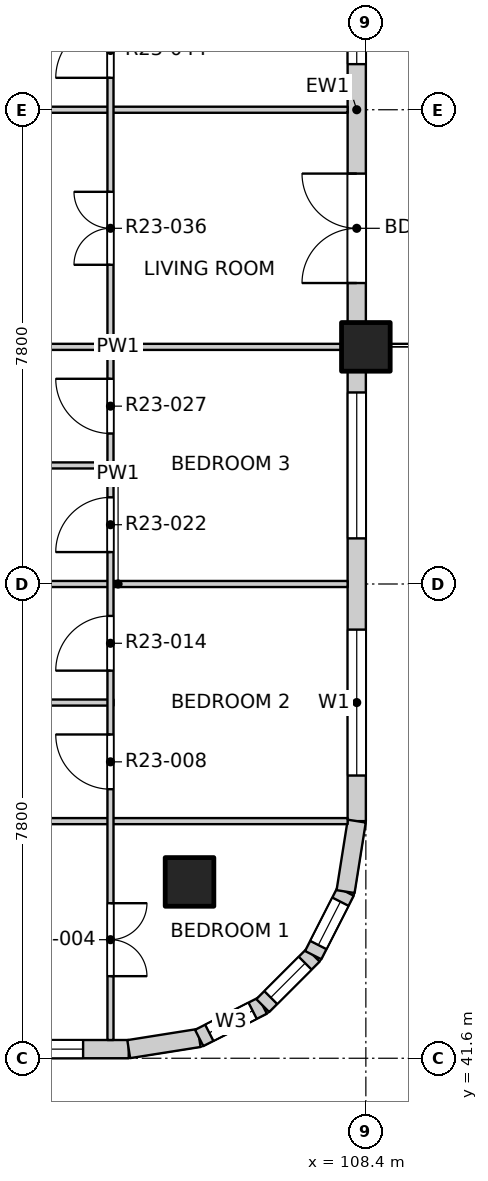
"""IFC4 building model, lengths in metres.
Left out: names, types, materials, properties, quantities, classifications, styles, units other than length and angle.
Written with IfcOpenShell. Run it as: python <this file> out.ifc"""

import sys

from ifc_helpers import new_model, si_unit, direction, frame, frame_2d, origin, origin_2d, place, context, subcontext, project, spatial, rectangle, extrude, element, fill, save


model = new_model("IFC4")
c1 = context("Model", 3, precision=1e-05, world=origin(), true_north=direction((0.0, 1.0)))
c2 = subcontext(c1, "Body", "Model", "MODEL_VIEW")
j1 = project(units=[si_unit("LENGTHUNIT", "METRE"), si_unit("PLANEANGLEUNIT", "RADIAN")], contexts=[c1])
p1 = place(None, origin())
s1 = spatial("IfcSite", under=j1, at=p1, CompositionType="ELEMENT")
p2 = place(p1, origin())
s2 = spatial("IfcBuilding", under=s1, at=p2, CompositionType="ELEMENT")
p3 = place(p2, frame((0.0, 0.0, 234.7)))
s3 = spatial("IfcBuildingStorey", under=s2, at=p3, CompositionType="ELEMENT", Elevation=234.7)
for number, where, z_axis, x_axis in (
    (1, (105.5, 44.5, -0.25), (0.0, 0.0, 1.0), (1.0, 0.0, 0.0)),
    (2, (108.4, 53.3, -0.25), (0.0, 0.0, 1.0), (1.0, 0.0, 0.0)),
):
    element("IfcColumn", number, at=place(p3, frame(where, z_axis=z_axis, x_axis=x_axis)), inside=s3, PredefinedType="COLUMN", context=c2, shape_type="SweptSolid", body=[
        extrude(rectangle(XDim=0.8, YDim=0.8, at=origin_2d()), origin(), (0.0, 0.0, 1.0), 3.4),
    ])
p4 = place(p3, frame((97.1, 41.75, 0.0), z_axis=(0.0, 0.0, 1.0), x_axis=(1.0, 0.0, 0.0)))
e3 = element("IfcWall", 3, at=p4, inside=s3, PredefinedType="SOLIDWALL", context=c2, shape_type="SweptSolid", body=[
    extrude(rectangle(XDim=7.4, YDim=0.3, at=frame_2d((3.7, 0.0))), origin(), (0.0, 0.0, 1.0), 2.7),
])
p5 = place(p4, frame((0.35, 0.0, 0.9)))
e4 = element("IfcOpeningElement", 4, at=p5, cuts=e3, PredefinedType="OPENING", context=c2, shape_type="SweptSolid", body=[
    extrude(rectangle(XDim=2.4, YDim=1.8, at=frame_2d((1.2, 0.9))), frame((0.0, 0.16, 0.0), z_axis=(0.0, -1.0, 0.0), x_axis=(1.0, 0.0, 0.0)), (0.0, 0.0, 1.0), 0.32),
])
p6 = place(p4, frame((4.25, 0.0, 0.9)))
e5 = element("IfcOpeningElement", 5, at=p6, cuts=e3, PredefinedType="OPENING", context=c2, shape_type="SweptSolid", body=[
    extrude(rectangle(XDim=2.4, YDim=1.8, at=frame_2d((1.2, 0.9))), frame((0.0, 0.16, 0.0), z_axis=(0.0, -1.0, 0.0), x_axis=(1.0, 0.0, 0.0)), (0.0, 0.0, 1.0), 0.32),
])
p7 = place(p3, frame((108.25, 45.5, 0.0), z_axis=(0.0, 0.0, 1.0), x_axis=(0.0, 1.0, 0.0)))
e6 = element("IfcWall", 6, at=p7, inside=s3, PredefinedType="SOLIDWALL", context=c2, shape_type="SweptSolid", body=[
    extrude(rectangle(XDim=7.4, YDim=0.3, at=frame_2d((3.7, 0.0))), origin(), (0.0, 0.0, 1.0), 2.7),
])
p8 = place(p7, frame((0.75, 0.0, 0.9)))
e7 = element("IfcOpeningElement", 7, at=p8, cuts=e6, PredefinedType="OPENING", context=c2, shape_type="SweptSolid", body=[
    extrude(rectangle(XDim=2.4, YDim=1.8, at=frame_2d((1.2, 0.9))), frame((0.0, 0.16, 0.0), z_axis=(0.0, -1.0, 0.0), x_axis=(1.0, 0.0, 0.0)), (0.0, 0.0, 1.0), 0.32),
])
p9 = place(p7, frame((4.65, 0.0, 0.9)))
e8 = element("IfcOpeningElement", 8, at=p9, cuts=e6, PredefinedType="OPENING", context=c2, shape_type="SweptSolid", body=[
    extrude(rectangle(XDim=2.4, YDim=1.8, at=frame_2d((1.2, 0.9))), frame((0.0, 0.16, 0.0), z_axis=(0.0, -1.0, 0.0), x_axis=(1.0, 0.0, 0.0)), (0.0, 0.0, 1.0), 0.32),
])
p10 = place(p3, frame((108.25, 53.7, 0.0), z_axis=(0.0, 0.0, 1.0), x_axis=(0.0, 1.0, 0.0)))
e9 = element("IfcWall", 9, at=p10, inside=s3, PredefinedType="SOLIDWALL", context=c2, shape_type="SweptSolid", body=[
    extrude(rectangle(XDim=7.0, YDim=0.3, at=frame_2d((3.5, 0.0))), origin(), (0.0, 0.0, 1.0), 2.7),
])
p11 = place(p10, frame((0.65, 0.0, 0.0)))
e10 = element("IfcOpeningElement", 10, at=p11, cuts=e9, PredefinedType="OPENING", context=c2, shape_type="SweptSolid", body=[
    extrude(rectangle(XDim=1.8, YDim=2.4, at=frame_2d((0.9, 1.2))), frame((0.0, 0.16, 0.0), z_axis=(0.0, -1.0, 0.0), x_axis=(1.0, 0.0, 0.0)), (0.0, 0.0, 1.0), 0.32),
])
p12 = place(p10, frame((4.25, 0.0, 0.9)))
e11 = element("IfcOpeningElement", 11, at=p12, cuts=e9, PredefinedType="OPENING", context=c2, shape_type="SweptSolid", body=[
    extrude(rectangle(XDim=2.4, YDim=1.8, at=frame_2d((1.2, 0.9))), frame((0.0, 0.16, 0.0), z_axis=(0.0, -1.0, 0.0), x_axis=(1.0, 0.0, 0.0)), (0.0, 0.0, 1.0), 0.32),
])
p13 = place(p3, frame((104.5, 41.75, 0.0), z_axis=(0.0, 0.0, 1.0), x_axis=(0.987678452879, 0.156496880861, 0.0)))
e12 = element("IfcWall", 12, at=p13, inside=s3, PredefinedType="SOLIDWALL", context=c2, shape_type="SweptSolid", body=[
    extrude(rectangle(XDim=1.173, YDim=0.3, at=frame_2d((0.586, 0.0))), origin(), (0.0, 0.0, 1.0), 2.7),
])
p14 = place(p3, frame((105.659, 41.934, 0.0), z_axis=(0.0, 0.0, 1.0), x_axis=(0.890988677504, 0.454025524128, 0.0)))
e13 = element("IfcWall", 13, at=p14, inside=s3, PredefinedType="SOLIDWALL", context=c2, shape_type="SweptSolid", body=[
    extrude(rectangle(XDim=1.173, YDim=0.3, at=frame_2d((0.587, 0.0))), origin(), (0.0, 0.0, 1.0), 2.7),
])
p15 = place(p14, frame((0.187, 0.0, 0.9)))
e14 = element("IfcOpeningElement", 14, at=p15, cuts=e13, PredefinedType="OPENING", context=c2, shape_type="SweptSolid", body=[
    extrude(rectangle(XDim=0.8, YDim=1.2, at=frame_2d((0.4, 0.6))), frame((0.0, 0.16, 0.0), z_axis=(0.0, -1.0, 0.0), x_axis=(1.0, 0.0, 0.0)), (0.0, 0.0, 1.0), 0.32),
])
p16 = place(p3, frame((106.704, 42.466, 0.0), z_axis=(0.0, 0.0, 1.0), x_axis=(0.707106781187, 0.707106781187, 0.0)))
e15 = element("IfcWall", 15, at=p16, inside=s3, PredefinedType="SOLIDWALL", context=c2, shape_type="SweptSolid", body=[
    extrude(rectangle(XDim=1.173, YDim=0.3, at=frame_2d((0.586, 0.0))), origin(), (0.0, 0.0, 1.0), 2.7),
])
p17 = place(p16, frame((0.187, 0.0, 0.9)))
e16 = element("IfcOpeningElement", 16, at=p17, cuts=e15, PredefinedType="OPENING", context=c2, shape_type="SweptSolid", body=[
    extrude(rectangle(XDim=0.8, YDim=1.2, at=frame_2d((0.4, 0.6))), frame((0.0, 0.16, 0.0), z_axis=(0.0, -1.0, 0.0), x_axis=(1.0, 0.0, 0.0)), (0.0, 0.0, 1.0), 0.32),
])
p18 = place(p3, frame((107.534, 43.296, 0.0), z_axis=(0.0, 0.0, 1.0), x_axis=(0.454025524128, 0.890988677504, 0.0)))
e17 = element("IfcWall", 17, at=p18, inside=s3, PredefinedType="SOLIDWALL", context=c2, shape_type="SweptSolid", body=[
    extrude(rectangle(XDim=1.173, YDim=0.3, at=frame_2d((0.587, 0.0))), origin(), (0.0, 0.0, 1.0), 2.7),
])
p19 = place(p18, frame((0.187, 0.0, 0.9)))
e18 = element("IfcOpeningElement", 18, at=p19, cuts=e17, PredefinedType="OPENING", context=c2, shape_type="SweptSolid", body=[
    extrude(rectangle(XDim=0.8, YDim=1.2, at=frame_2d((0.4, 0.6))), frame((0.0, 0.16, 0.0), z_axis=(0.0, -1.0, 0.0), x_axis=(1.0, 0.0, 0.0)), (0.0, 0.0, 1.0), 0.32),
])
p20 = place(p3, frame((108.066, 44.341, 0.0), z_axis=(0.0, 0.0, 1.0), x_axis=(0.156496880861, 0.987678452879, 0.0)))
e19 = element("IfcWall", 19, at=p20, inside=s3, PredefinedType="SOLIDWALL", context=c2, shape_type="SweptSolid", body=[
    extrude(rectangle(XDim=1.173, YDim=0.3, at=frame_2d((0.586, 0.0))), origin(), (0.0, 0.0, 1.0), 2.7),
])
p21 = place(p3, frame((96.625, 45.5, 0.0), z_axis=(0.0, 0.0, 1.0), x_axis=(1.0, 0.0, 0.0)))
e20 = element("IfcWall", 20, at=p21, inside=s3, PredefinedType="PARTITIONING", context=c2, shape_type="SweptSolid", body=[
    extrude(rectangle(XDim=11.475, YDim=0.1, at=frame_2d((5.738, 0.0))), origin(), (0.0, 0.0, 1.0), 3.15),
])
p22 = place(p21, frame((2.61, 0.0, 0.0)))
e21 = element("IfcOpeningElement", 21, at=p22, cuts=e20, PredefinedType="OPENING", context=c2, shape_type="SweptSolid", body=[
    extrude(rectangle(XDim=0.9, YDim=2.1, at=frame_2d((0.45, 1.05))), frame((0.0, 0.06, 0.0), z_axis=(0.0, -1.0, 0.0), x_axis=(1.0, 0.0, 0.0)), (0.0, 0.0, 1.0), 0.12),
])
p23 = place(p3, frame((100.55, 47.45, 0.0), z_axis=(0.0, 0.0, 1.0), x_axis=(1.0, 0.0, 0.0)))
e22 = element("IfcWall", 22, at=p23, inside=s3, PredefinedType="PARTITIONING", context=c2, shape_type="SweptSolid", body=[
    extrude(rectangle(XDim=3.7, YDim=0.1, at=frame_2d((1.85, 0.0))), origin(), (0.0, 0.0, 1.0), 3.15),
])
p24 = place(p3, frame((100.55, 49.4, 0.0), z_axis=(0.0, 0.0, 1.0), x_axis=(1.0, 0.0, 0.0)))
e23 = element("IfcWall", 23, at=p24, inside=s3, PredefinedType="PARTITIONING", context=c2, shape_type="SweptSolid", body=[
    extrude(rectangle(XDim=7.55, YDim=0.1, at=frame_2d((3.775, 0.0))), origin(), (0.0, 0.0, 1.0), 3.15),
])
p25 = place(p3, frame((100.55, 51.35, 0.0), z_axis=(0.0, 0.0, 1.0), x_axis=(1.0, 0.0, 0.0)))
e24 = element("IfcWall", 24, at=p25, inside=s3, PredefinedType="PARTITIONING", context=c2, shape_type="SweptSolid", body=[
    extrude(rectangle(XDim=3.7, YDim=0.1, at=frame_2d((1.85, 0.0))), origin(), (0.0, 0.0, 1.0), 3.15),
])
for number, where, z_axis, x_axis in (
    (25, (100.55, 53.3, 0.0), (0.0, 0.0, 1.0), (1.0, 0.0, 0.0)),
    (26, (100.55, 57.2, 0.0), (0.0, 0.0, 1.0), (1.0, 0.0, 0.0)),
):
    element("IfcWall", number, at=place(p3, frame(where, z_axis=z_axis, x_axis=x_axis)), inside=s3, PredefinedType="PARTITIONING", context=c2, shape_type="SweptSolid", body=[
        extrude(rectangle(XDim=7.55, YDim=0.1, at=frame_2d((3.775, 0.0))), origin(), (0.0, 0.0, 1.0), 3.15),
    ])
p26 = place(p3, frame((104.2, 41.9, 0.0), z_axis=(0.0, 0.0, 1.0), x_axis=(0.0, 1.0, 0.0)))
e27 = element("IfcWall", 27, at=p26, inside=s3, PredefinedType="PARTITIONING", context=c2, shape_type="SweptSolid", body=[
    extrude(rectangle(XDim=19.1, YDim=0.1, at=frame_2d((9.55, 0.0))), origin(), (0.0, 0.0, 1.0), 3.15),
])
p27 = place(p26, frame((1.05, 0.0, 0.0)))
e28 = element("IfcOpeningElement", 28, at=p27, cuts=e27, PredefinedType="OPENING", context=c2, shape_type="SweptSolid", body=[
    extrude(rectangle(XDim=1.2, YDim=2.1, at=frame_2d((0.6, 1.05))), frame((0.0, 0.06, 0.0), z_axis=(0.0, -1.0, 0.0), x_axis=(1.0, 0.0, 0.0)), (0.0, 0.0, 1.0), 0.12),
])
p28 = place(p26, frame((4.125, 0.0, 0.0)))
e29 = element("IfcOpeningElement", 29, at=p28, cuts=e27, PredefinedType="OPENING", context=c2, shape_type="SweptSolid", body=[
    extrude(rectangle(XDim=0.9, YDim=2.1, at=frame_2d((0.45, 1.05))), frame((0.0, 0.06, 0.0), z_axis=(0.0, -1.0, 0.0), x_axis=(1.0, 0.0, 0.0)), (0.0, 0.0, 1.0), 0.12),
])
p29 = place(p26, frame((6.075, 0.0, 0.0)))
e30 = element("IfcOpeningElement", 30, at=p29, cuts=e27, PredefinedType="OPENING", context=c2, shape_type="SweptSolid", body=[
    extrude(rectangle(XDim=0.9, YDim=2.1, at=frame_2d((0.45, 1.05))), frame((0.0, 0.06, 0.0), z_axis=(0.0, -1.0, 0.0), x_axis=(1.0, 0.0, 0.0)), (0.0, 0.0, 1.0), 0.12),
])
p30 = place(p26, frame((8.025, 0.0, 0.0)))
e31 = element("IfcOpeningElement", 31, at=p30, cuts=e27, PredefinedType="OPENING", context=c2, shape_type="SweptSolid", body=[
    extrude(rectangle(XDim=0.9, YDim=2.1, at=frame_2d((0.45, 1.05))), frame((0.0, 0.06, 0.0), z_axis=(0.0, -1.0, 0.0), x_axis=(1.0, 0.0, 0.0)), (0.0, 0.0, 1.0), 0.12),
])
p31 = place(p26, frame((9.975, 0.0, 0.0)))
e32 = element("IfcOpeningElement", 32, at=p31, cuts=e27, PredefinedType="OPENING", context=c2, shape_type="SweptSolid", body=[
    extrude(rectangle(XDim=0.9, YDim=2.1, at=frame_2d((0.45, 1.05))), frame((0.0, 0.06, 0.0), z_axis=(0.0, -1.0, 0.0), x_axis=(1.0, 0.0, 0.0)), (0.0, 0.0, 1.0), 0.12),
])
p32 = place(p26, frame((12.75, 0.0, 0.0)))
e33 = element("IfcOpeningElement", 33, at=p32, cuts=e27, PredefinedType="OPENING", context=c2, shape_type="SweptSolid", body=[
    extrude(rectangle(XDim=1.2, YDim=2.1, at=frame_2d((0.6, 1.05))), frame((0.0, 0.06, 0.0), z_axis=(0.0, -1.0, 0.0), x_axis=(1.0, 0.0, 0.0)), (0.0, 0.0, 1.0), 0.12),
])
p33 = place(p26, frame((15.825, 0.0, 0.0)))
e34 = element("IfcOpeningElement", 34, at=p33, cuts=e27, PredefinedType="OPENING", context=c2, shape_type="SweptSolid", body=[
    extrude(rectangle(XDim=0.9, YDim=2.1, at=frame_2d((0.45, 1.05))), frame((0.0, 0.06, 0.0), z_axis=(0.0, -1.0, 0.0), x_axis=(1.0, 0.0, 0.0)), (0.0, 0.0, 1.0), 0.12),
])
p34 = place(p26, frame((17.775, 0.0, 0.0)))
e35 = element("IfcOpeningElement", 35, at=p34, cuts=e27, PredefinedType="OPENING", context=c2, shape_type="SweptSolid", body=[
    extrude(rectangle(XDim=0.9, YDim=2.1, at=frame_2d((0.45, 1.05))), frame((0.0, 0.06, 0.0), z_axis=(0.0, -1.0, 0.0), x_axis=(1.0, 0.0, 0.0)), (0.0, 0.0, 1.0), 0.12),
])
p35 = place(p6, origin())
e36 = element("IfcWindow", 36, at=p35, inside=s3, PartitioningType="DOUBLE_PANEL_VERTICAL", PredefinedType="WINDOW", context=c2, shape_type="SweptSolid", body=[
    extrude(rectangle(XDim=2.4, YDim=1.8, at=frame_2d((1.2, 0.9))), frame((0.0, 0.03, 0.0), z_axis=(0.0, -1.0, 0.0), x_axis=(1.0, 0.0, 0.0)), (0.0, 0.0, 1.0), 0.06),
])
fill(e5, e36)
p36 = place(p8, origin())
e37 = element("IfcWindow", 37, at=p36, inside=s3, PartitioningType="DOUBLE_PANEL_VERTICAL", PredefinedType="WINDOW", context=c2, shape_type="SweptSolid", body=[
    extrude(rectangle(XDim=2.4, YDim=1.8, at=frame_2d((1.2, 0.9))), frame((0.0, 0.03, 0.0), z_axis=(0.0, -1.0, 0.0), x_axis=(1.0, 0.0, 0.0)), (0.0, 0.0, 1.0), 0.06),
])
fill(e7, e37)
p37 = place(p9, origin())
e38 = element("IfcWindow", 38, at=p37, inside=s3, PartitioningType="DOUBLE_PANEL_VERTICAL", PredefinedType="WINDOW", context=c2, shape_type="SweptSolid", body=[
    extrude(rectangle(XDim=2.4, YDim=1.8, at=frame_2d((1.2, 0.9))), frame((0.0, 0.03, 0.0), z_axis=(0.0, -1.0, 0.0), x_axis=(1.0, 0.0, 0.0)), (0.0, 0.0, 1.0), 0.06),
])
fill(e8, e38)
p38 = place(p11, origin())
e39 = element("IfcDoor", 39, at=p38, inside=s3, OperationType="DOUBLE_DOOR_SINGLE_SWING", PredefinedType="DOOR", context=c2, shape_type="SweptSolid", body=[
    extrude(rectangle(XDim=1.8, YDim=2.4, at=frame_2d((0.9, 1.2))), frame((0.0, 0.025, 0.0), z_axis=(0.0, -1.0, 0.0), x_axis=(1.0, 0.0, 0.0)), (0.0, 0.0, 1.0), 0.05),
])
fill(e10, e39)
p39 = place(p12, origin())
e40 = element("IfcWindow", 40, at=p39, inside=s3, PartitioningType="DOUBLE_PANEL_VERTICAL", PredefinedType="WINDOW", context=c2, shape_type="SweptSolid", body=[
    extrude(rectangle(XDim=2.4, YDim=1.8, at=frame_2d((1.2, 0.9))), frame((0.0, 0.03, 0.0), z_axis=(0.0, -1.0, 0.0), x_axis=(1.0, 0.0, 0.0)), (0.0, 0.0, 1.0), 0.06),
])
fill(e11, e40)
p40 = place(p15, origin())
e41 = element("IfcWindow", 41, at=p40, inside=s3, PartitioningType="SINGLE_PANEL", PredefinedType="WINDOW", context=c2, shape_type="SweptSolid", body=[
    extrude(rectangle(XDim=0.8, YDim=1.2, at=frame_2d((0.4, 0.6))), frame((0.0, 0.03, 0.0), z_axis=(0.0, -1.0, 0.0), x_axis=(1.0, 0.0, 0.0)), (0.0, 0.0, 1.0), 0.06),
])
fill(e14, e41)
p41 = place(p17, origin())
e42 = element("IfcWindow", 42, at=p41, inside=s3, PartitioningType="SINGLE_PANEL", PredefinedType="WINDOW", context=c2, shape_type="SweptSolid", body=[
    extrude(rectangle(XDim=0.8, YDim=1.2, at=frame_2d((0.4, 0.6))), frame((0.0, 0.03, 0.0), z_axis=(0.0, -1.0, 0.0), x_axis=(1.0, 0.0, 0.0)), (0.0, 0.0, 1.0), 0.06),
])
fill(e16, e42)
p42 = place(p19, origin())
e43 = element("IfcWindow", 43, at=p42, inside=s3, PartitioningType="SINGLE_PANEL", PredefinedType="WINDOW", context=c2, shape_type="SweptSolid", body=[
    extrude(rectangle(XDim=0.8, YDim=1.2, at=frame_2d((0.4, 0.6))), frame((0.0, 0.03, 0.0), z_axis=(0.0, -1.0, 0.0), x_axis=(1.0, 0.0, 0.0)), (0.0, 0.0, 1.0), 0.06),
])
fill(e18, e43)
p43 = place(p27, origin())
e44 = element("IfcDoor", 44, at=p43, inside=s3, OperationType="DOUBLE_DOOR_SINGLE_SWING", PredefinedType="DOOR", context=c2, shape_type="SweptSolid", body=[
    extrude(rectangle(XDim=1.2, YDim=2.1, at=frame_2d((0.6, 1.05))), frame((0.0, 0.025, 0.0), z_axis=(0.0, -1.0, 0.0), x_axis=(1.0, 0.0, 0.0)), (0.0, 0.0, 1.0), 0.05),
])
fill(e28, e44)
p44 = place(p28, origin())
e45 = element("IfcDoor", 45, at=p44, inside=s3, OperationType="SINGLE_SWING_RIGHT", PredefinedType="DOOR", context=c2, shape_type="SweptSolid", body=[
    extrude(rectangle(XDim=0.9, YDim=2.1, at=frame_2d((0.45, 1.05))), frame((0.0, 0.025, 0.0), z_axis=(0.0, -1.0, 0.0), x_axis=(1.0, 0.0, 0.0)), (0.0, 0.0, 1.0), 0.05),
])
fill(e29, e45)
p45 = place(p29, origin())
e46 = element("IfcDoor", 46, at=p45, inside=s3, OperationType="SINGLE_SWING_LEFT", PredefinedType="DOOR", context=c2, shape_type="SweptSolid", body=[
    extrude(rectangle(XDim=0.9, YDim=2.1, at=frame_2d((0.45, 1.05))), frame((0.0, 0.025, 0.0), z_axis=(0.0, -1.0, 0.0), x_axis=(1.0, 0.0, 0.0)), (0.0, 0.0, 1.0), 0.05),
])
fill(e30, e46)
p46 = place(p30, origin())
e47 = element("IfcDoor", 47, at=p46, inside=s3, OperationType="SINGLE_SWING_LEFT", PredefinedType="DOOR", context=c2, shape_type="SweptSolid", body=[
    extrude(rectangle(XDim=0.9, YDim=2.1, at=frame_2d((0.45, 1.05))), frame((0.0, 0.025, 0.0), z_axis=(0.0, -1.0, 0.0), x_axis=(1.0, 0.0, 0.0)), (0.0, 0.0, 1.0), 0.05),
])
fill(e31, e47)
p47 = place(p31, origin())
e48 = element("IfcDoor", 48, at=p47, inside=s3, OperationType="SINGLE_SWING_RIGHT", PredefinedType="DOOR", context=c2, shape_type="SweptSolid", body=[
    extrude(rectangle(XDim=0.9, YDim=2.1, at=frame_2d((0.45, 1.05))), frame((0.0, 0.025, 0.0), z_axis=(0.0, -1.0, 0.0), x_axis=(1.0, 0.0, 0.0)), (0.0, 0.0, 1.0), 0.05),
])
fill(e32, e48)
p48 = place(p32, origin())
e49 = element("IfcDoor", 49, at=p48, inside=s3, OperationType="DOUBLE_DOOR_SINGLE_SWING", PredefinedType="DOOR", context=c2, shape_type="SweptSolid", body=[
    extrude(rectangle(XDim=1.2, YDim=2.1, at=frame_2d((0.6, 1.05))), frame((0.0, 0.025, 0.0), z_axis=(0.0, -1.0, 0.0), x_axis=(1.0, 0.0, 0.0)), (0.0, 0.0, 1.0), 0.05),
])
fill(e33, e49)
p49 = place(p33, origin())
e50 = element("IfcDoor", 50, at=p49, inside=s3, OperationType="SINGLE_SWING_LEFT", PredefinedType="DOOR", context=c2, shape_type="SweptSolid", body=[
    extrude(rectangle(XDim=0.9, YDim=2.1, at=frame_2d((0.45, 1.05))), frame((0.0, 0.025, 0.0), z_axis=(0.0, -1.0, 0.0), x_axis=(1.0, 0.0, 0.0)), (0.0, 0.0, 1.0), 0.05),
])
fill(e34, e50)
save(model, sys.argv[1])
